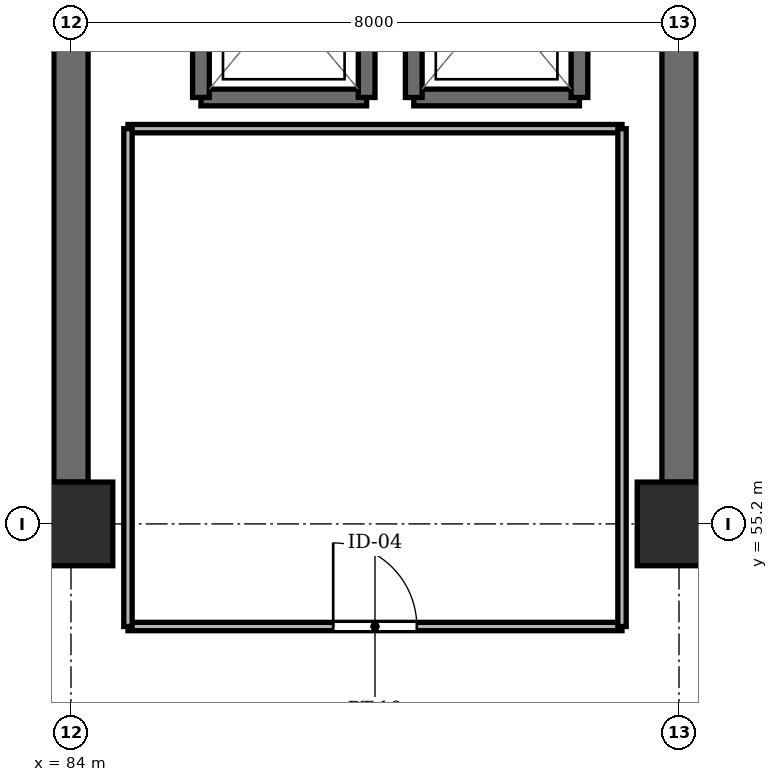
"""IFC4 building model, lengths in metres.
Left out: names, types, materials, properties, quantities, classifications, styles, units other than length and angle.
Written with IfcOpenShell. Run it as: python <this file> out.ifc"""

import sys

from ifc_helpers import new_model, si_unit, direction, frame, frame_2d, origin, origin_2d, place, context, subcontext, project, spatial, rectangle, extrude, element, fill, save


model = new_model("IFC4")
c1 = context("Model", 3, precision=1e-05, world=origin(), true_north=direction((0.0, 1.0)))
c2 = subcontext(c1, "Body", "Model", "MODEL_VIEW")
j1 = project(units=[si_unit("LENGTHUNIT", "METRE"), si_unit("PLANEANGLEUNIT", "RADIAN")], contexts=[c1])
p1 = place(None, origin())
s1 = spatial("IfcSite", under=j1, at=p1, CompositionType="ELEMENT")
p2 = place(p1, origin())
s2 = spatial("IfcBuilding", under=s1, at=p2, CompositionType="ELEMENT")
p3 = place(p2, frame((0.0, 0.0, 27.55)))
s3 = spatial("IfcBuildingStorey", under=s2, at=p3, CompositionType="ELEMENT", Elevation=27.55)
for number, where, z_axis, x_axis in (
    (1, (84.0, 55.2, -0.26), (0.0, 0.0, 1.0), (1.0, 0.0, 0.0)),
    (2, (92.0, 55.2, -0.26), (0.0, 0.0, 1.0), (1.0, 0.0, 0.0)),
):
    element("IfcColumn", number, at=place(p3, frame(where, z_axis=z_axis, x_axis=x_axis)), inside=s3, PredefinedType="COLUMN", context=c2, shape_type="SweptSolid", body=[
        extrude(rectangle(XDim=1.1, YDim=1.1, at=origin_2d()), origin(), (0.0, 0.0, 1.0), 3.25),
    ])
for number, where, z_axis, x_axis in (
    (3, (84.0, 55.75, 0.0), (0.0, 0.0, 1.0), (0.0, 1.0, 0.0)),
    (4, (92.0, 55.75, 0.0), (0.0, 0.0, 1.0), (0.0, 1.0, 0.0)),
):
    element("IfcWall", number, at=place(p3, frame(where, z_axis=z_axis, x_axis=x_axis)), inside=s3, PredefinedType="SHEAR", context=c2, shape_type="SweptSolid", body=[
        extrude(rectangle(XDim=6.2, YDim=0.45, at=frame_2d((3.1, 0.0))), origin(), (0.0, 0.0, 1.0), 2.99),
    ])
p4 = place(p3, frame((85.71, 60.81, 0.0), z_axis=(0.0, 0.0, 1.0), x_axis=(1.0, 0.0, 0.0)))
e5 = element("IfcWall", 5, at=p4, inside=s3, PredefinedType="SHEAR", context=c2, shape_type="SweptSolid", body=[
    extrude(rectangle(XDim=2.18, YDim=0.22, at=frame_2d((1.09, 0.0))), origin(), (0.0, 0.0, 1.0), 2.99),
])
for number, where, z_axis, x_axis in (
    (6, (85.71, 63.39, 0.0), (0.0, 0.0, 1.0), (0.0, -1.0, 0.0)),
    (7, (87.89, 60.81, 0.0), (0.0, 0.0, 1.0), (0.0, 1.0, 0.0)),
):
    element("IfcWall", number, at=place(p3, frame(where, z_axis=z_axis, x_axis=x_axis)), inside=s3, PredefinedType="SHEAR", context=c2, shape_type="SweptSolid", body=[
        extrude(rectangle(XDim=2.58, YDim=0.22, at=frame_2d((1.29, 0.0))), origin(), (0.0, 0.0, 1.0), 2.99),
    ])
p5 = place(p3, frame((88.51, 60.81, 0.0), z_axis=(0.0, 0.0, 1.0), x_axis=(1.0, 0.0, 0.0)))
e8 = element("IfcWall", 8, at=p5, inside=s3, PredefinedType="SHEAR", context=c2, shape_type="SweptSolid", body=[
    extrude(rectangle(XDim=2.18, YDim=0.22, at=frame_2d((1.09, 0.0))), origin(), (0.0, 0.0, 1.0), 2.99),
])
for number, where, z_axis, x_axis in (
    (9, (88.51, 63.39, 0.0), (0.0, 0.0, 1.0), (0.0, -1.0, 0.0)),
    (10, (90.69, 60.81, 0.0), (0.0, 0.0, 1.0), (0.0, 1.0, 0.0)),
):
    element("IfcWall", number, at=place(p3, frame(where, z_axis=z_axis, x_axis=x_axis)), inside=s3, PredefinedType="SHEAR", context=c2, shape_type="SweptSolid", body=[
        extrude(rectangle(XDim=2.58, YDim=0.22, at=frame_2d((1.29, 0.0))), origin(), (0.0, 0.0, 1.0), 2.99),
    ])
p6 = place(p3, frame((84.75, 53.85, 0.0), z_axis=(0.0, 0.0, 1.0), x_axis=(1.0, 0.0, 0.0)))
e11 = element("IfcWall", 11, at=p6, inside=s3, PredefinedType="PARTITIONING", context=c2, shape_type="SweptSolid", body=[
    extrude(rectangle(XDim=6.5, YDim=0.11, at=frame_2d((3.25, 0.0))), origin(), (0.0, 0.0, 1.0), 2.53),
])
p7 = place(p6, frame((2.7, 0.0, 0.0)))
e12 = element("IfcOpeningElement", 12, at=p7, cuts=e11, PredefinedType="OPENING", context=c2, shape_type="SweptSolid", body=[
    extrude(rectangle(XDim=1.1, YDim=2.15, at=frame_2d((0.55, 1.075))), frame((0.0, 0.067, 0.0), z_axis=(0.0, -1.0, 0.0), x_axis=(1.0, 0.0, 0.0)), (0.0, 0.0, 1.0), 0.134),
])
p8 = place(p3, frame((84.75, 60.4, 0.0), z_axis=(0.0, 0.0, 1.0), x_axis=(1.0, 0.0, 0.0)))
e13 = element("IfcWall", 13, at=p8, inside=s3, PredefinedType="PARTITIONING", context=c2, shape_type="SweptSolid", body=[
    extrude(rectangle(XDim=6.5, YDim=0.11, at=frame_2d((3.25, 0.0))), origin(), (0.0, 0.0, 1.0), 2.53),
])
for number, where, z_axis, x_axis in (
    (14, (84.75, 53.85, 0.0), (0.0, 0.0, 1.0), (0.0, 1.0, 0.0)),
    (15, (91.25, 53.85, 0.0), (0.0, 0.0, 1.0), (0.0, 1.0, 0.0)),
):
    element("IfcWall", number, at=place(p3, frame(where, z_axis=z_axis, x_axis=x_axis)), inside=s3, PredefinedType="PARTITIONING", context=c2, shape_type="SweptSolid", body=[
        extrude(rectangle(XDim=6.55, YDim=0.11, at=frame_2d((3.275, 0.0))), origin(), (0.0, 0.0, 1.0), 2.53),
    ])
p9 = place(p7, origin())
e16 = element("IfcDoor", 16, at=p9, inside=s3, OperationType="SINGLE_SWING_LEFT", PredefinedType="DOOR", context=c2, shape_type="SweptSolid", body=[
    extrude(rectangle(XDim=1.1, YDim=2.15, at=frame_2d((0.55, 1.075))), frame((0.0, 0.025, 0.0), z_axis=(0.0, -1.0, 0.0), x_axis=(1.0, 0.0, 0.0)), (0.0, 0.0, 1.0), 0.05),
])
fill(e12, e16)
save(model, sys.argv[1])
